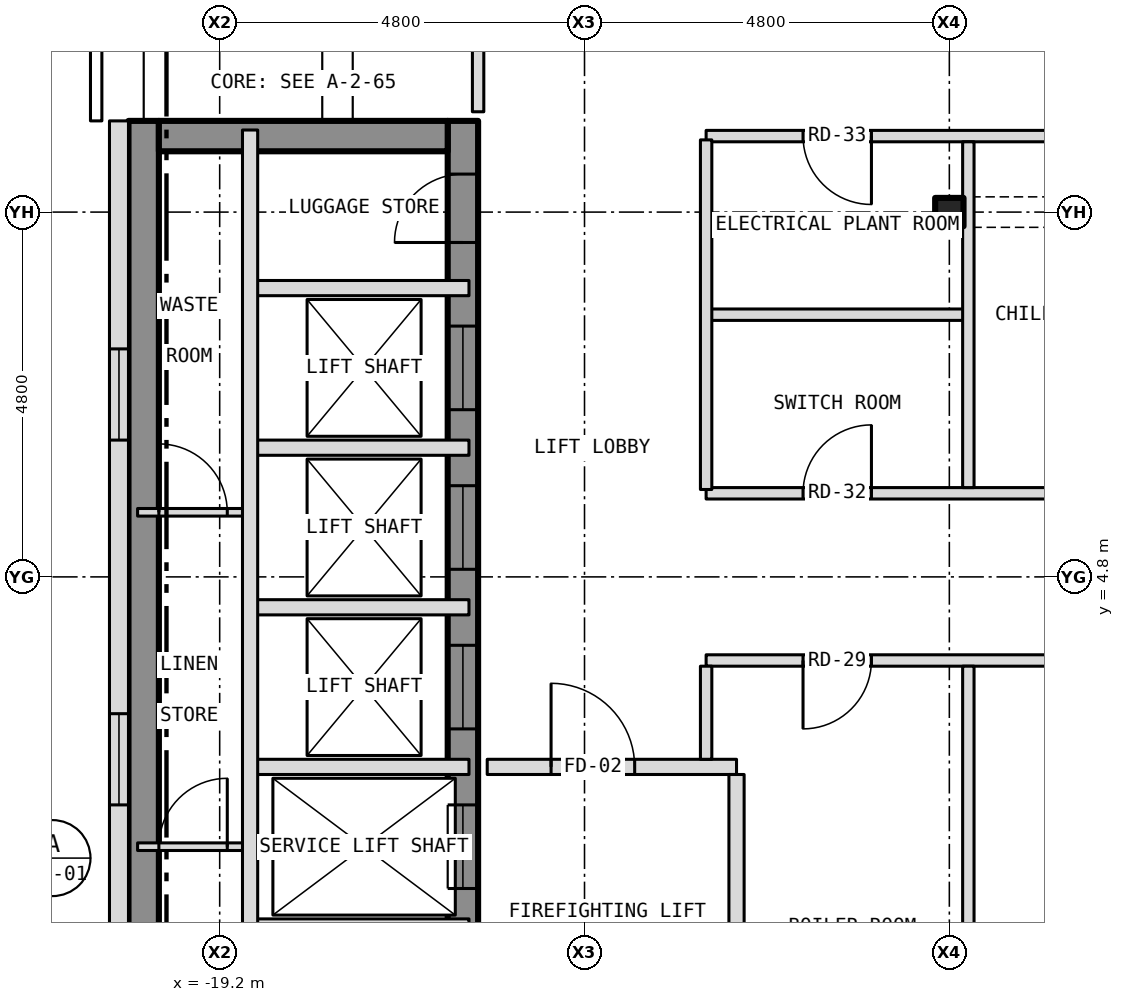
"""IFC4 building model, lengths in metres.
Left out: names, types, materials, properties, quantities, classifications, styles, units other than length and angle.
Written with IfcOpenShell. Run it as: python <this file> out.ifc"""

import sys

from ifc_helpers import new_model, si_unit, direction, frame, frame_2d, origin, origin_2d, place, context, subcontext, project, spatial, rectangle, i_section, extrude, element, fill, save


model = new_model("IFC4")
c1 = context("Model", 3, precision=1e-05, world=origin(), true_north=direction((0.0, 1.0)))
c2 = subcontext(c1, "Body", "Model", "MODEL_VIEW")
j1 = project(units=[si_unit("LENGTHUNIT", "METRE"), si_unit("PLANEANGLEUNIT", "RADIAN")], contexts=[c1])
p1 = place(None, origin())
s1 = spatial("IfcSite", under=j1, at=p1, CompositionType="ELEMENT")
p2 = place(p1, origin())
s2 = spatial("IfcBuilding", under=s1, at=p2, CompositionType="ELEMENT")
p3 = place(p2, frame((0.0, 0.0, 236.5)))
s3 = spatial("IfcBuildingStorey", under=s2, at=p3, CompositionType="ELEMENT", Elevation=236.5)
p4 = place(p3, frame((-9.6, 9.6, -0.3), z_axis=(0.0, 0.0, 1.0), x_axis=(1.0, 0.0, 0.0)))
e1 = element("IfcColumn", 1, at=p4, inside=s3, PredefinedType="COLUMN", context=c2, shape_type="SweptSolid", body=[
    extrude(i_section(OverallWidth=0.373, OverallDepth=0.373, WebThickness=0.016, FlangeThickness=0.026, at=origin_2d()), origin(), (0.0, 0.0, 1.0), 4.65),
])
p5 = place(p3, frame((-16.0, -10.8, 0.0), z_axis=(0.0, 0.0, 1.0), x_axis=(0.0, 1.0, 0.0)))
e2 = element("IfcWall", 2, at=p5, inside=s3, PredefinedType="SHEAR", context=c2, shape_type="SweptSolid", body=[
    extrude(rectangle(XDim=21.6, YDim=0.4, at=frame_2d((10.8, 0.0))), origin(), (0.0, 0.0, 1.0), 3.9),
])
p6 = place(p5, frame((9.4, 0.0, 0.0)))
e3 = element("IfcOpeningElement", 3, at=p6, cuts=e2, PredefinedType="OPENING", context=c2, shape_type="SweptSolid", body=[
    extrude(rectangle(XDim=1.1, YDim=2.1, at=frame_2d((0.55, 1.05))), frame((0.0, 0.212, 0.0), z_axis=(0.0, -1.0, 0.0), x_axis=(1.0, 0.0, 0.0)), (0.0, 0.0, 1.0), 0.424),
])
p7 = place(p5, frame((11.5, 0.0, 0.0)))
e4 = element("IfcOpeningElement", 4, at=p7, cuts=e2, PredefinedType="OPENING", context=c2, shape_type="SweptSolid", body=[
    extrude(rectangle(XDim=1.1, YDim=2.1, at=frame_2d((0.55, 1.05))), frame((0.0, 0.212, 0.0), z_axis=(0.0, -1.0, 0.0), x_axis=(1.0, 0.0, 0.0)), (0.0, 0.0, 1.0), 0.424),
])
p8 = place(p5, frame((13.6, 0.0, 0.0)))
e5 = element("IfcOpeningElement", 5, at=p8, cuts=e2, PredefinedType="OPENING", context=c2, shape_type="SweptSolid", body=[
    extrude(rectangle(XDim=1.1, YDim=2.1, at=frame_2d((0.55, 1.05))), frame((0.0, 0.212, 0.0), z_axis=(0.0, -1.0, 0.0), x_axis=(1.0, 0.0, 0.0)), (0.0, 0.0, 1.0), 0.424),
])
p9 = place(p5, frame((15.7, 0.0, 0.0)))
e6 = element("IfcOpeningElement", 6, at=p9, cuts=e2, PredefinedType="OPENING", context=c2, shape_type="SweptSolid", body=[
    extrude(rectangle(XDim=1.1, YDim=2.1, at=frame_2d((0.55, 1.05))), frame((0.0, 0.212, 0.0), z_axis=(0.0, -1.0, 0.0), x_axis=(1.0, 0.0, 0.0)), (0.0, 0.0, 1.0), 0.424),
])
p10 = place(p5, frame((17.8, 0.0, 0.0)))
e7 = element("IfcOpeningElement", 7, at=p10, cuts=e2, PredefinedType="OPENING", context=c2, shape_type="SweptSolid", body=[
    extrude(rectangle(XDim=1.1, YDim=2.1, at=frame_2d((0.55, 1.05))), frame((0.0, 0.212, 0.0), z_axis=(0.0, -1.0, 0.0), x_axis=(1.0, 0.0, 0.0)), (0.0, 0.0, 1.0), 0.424),
])
p11 = place(p5, frame((0.458, 0.0, 0.0)))
e8 = element("IfcOpeningElement", 8, at=p11, cuts=e2, PredefinedType="OPENING", context=c2, shape_type="SweptSolid", body=[
    extrude(rectangle(XDim=1.1, YDim=2.1, at=frame_2d((0.55, 1.05))), frame((0.0, 0.212, 0.0), z_axis=(0.0, -1.0, 0.0), x_axis=(1.0, 0.0, 0.0)), (0.0, 0.0, 1.0), 0.424),
])
p12 = place(p5, frame((7.5, 0.0, 0.0)))
e9 = element("IfcOpeningElement", 9, at=p12, cuts=e2, PredefinedType="OPENING", context=c2, shape_type="SweptSolid", body=[
    extrude(rectangle(XDim=1.1, YDim=2.1, at=frame_2d((0.55, 1.05))), frame((0.0, 0.212, 0.0), z_axis=(0.0, -1.0, 0.0), x_axis=(1.0, 0.0, 0.0)), (0.0, 0.0, 1.0), 0.424),
])
p13 = place(p5, frame((20.0, 0.0, 0.0)))
e10 = element("IfcOpeningElement", 10, at=p13, cuts=e2, PredefinedType="OPENING", context=c2, shape_type="SweptSolid", body=[
    extrude(rectangle(XDim=0.9, YDim=2.1, at=frame_2d((0.45, 1.05))), frame((0.0, 0.212, 0.0), z_axis=(0.0, -1.0, 0.0), x_axis=(1.0, 0.0, 0.0)), (0.0, 0.0, 1.0), 0.424),
])
p14 = place(p3, frame((-20.2, -10.8, 0.0), z_axis=(0.0, 0.0, 1.0), x_axis=(0.0, 1.0, 0.0)))
e11 = element("IfcWall", 11, at=p14, inside=s3, PredefinedType="SHEAR", context=c2, shape_type="SweptSolid", body=[
    extrude(rectangle(XDim=21.6, YDim=0.4, at=frame_2d((10.8, 0.0))), origin(), (0.0, 0.0, 1.0), 3.9),
])
p15 = place(p3, frame((-20.0, 10.6, 0.0), z_axis=(0.0, 0.0, 1.0), x_axis=(1.0, 0.0, 0.0)))
e12 = element("IfcWall", 12, at=p15, inside=s3, PredefinedType="SHEAR", context=c2, shape_type="SweptSolid", body=[
    extrude(rectangle(XDim=3.8, YDim=0.4, at=frame_2d((1.9, 0.0))), origin(), (0.0, 0.0, 1.0), 3.9),
])
p16 = place(p3, frame((-20.525, 10.8, 0.0), z_axis=(0.0, 0.0, 1.0), x_axis=(0.0, -1.0, 0.0)))
e13 = element("IfcWall", 13, at=p16, inside=s3, PredefinedType="SOLIDWALL", context=c2, shape_type="SweptSolid", body=[
    extrude(rectangle(XDim=21.6, YDim=0.25, at=frame_2d((10.8, 0.0))), origin(), (0.0, 0.0, 1.0), 4.5),
])
p17 = place(p16, frame((3.0, 0.0, 2.2)))
e14 = element("IfcOpeningElement", 14, at=p17, cuts=e13, PredefinedType="OPENING", context=c2, shape_type="SweptSolid", body=[
    extrude(rectangle(XDim=1.2, YDim=0.6, at=frame_2d((0.6, 0.3))), frame((0.0, 0.137, 0.0), z_axis=(0.0, -1.0, 0.0), x_axis=(1.0, 0.0, 0.0)), (0.0, 0.0, 1.0), 0.274),
])
p18 = place(p16, frame((7.8, 0.0, 2.2)))
e15 = element("IfcOpeningElement", 15, at=p18, cuts=e13, PredefinedType="OPENING", context=c2, shape_type="SweptSolid", body=[
    extrude(rectangle(XDim=1.2, YDim=0.6, at=frame_2d((0.6, 0.3))), frame((0.0, 0.137, 0.0), z_axis=(0.0, -1.0, 0.0), x_axis=(1.0, 0.0, 0.0)), (0.0, 0.0, 1.0), 0.274),
])
p19 = place(p16, frame((12.6, 0.0, 2.2)))
e16 = element("IfcOpeningElement", 16, at=p19, cuts=e13, PredefinedType="OPENING", context=c2, shape_type="SweptSolid", body=[
    extrude(rectangle(XDim=1.2, YDim=0.6, at=frame_2d((0.6, 0.3))), frame((0.0, 0.137, 0.0), z_axis=(0.0, -1.0, 0.0), x_axis=(1.0, 0.0, 0.0)), (0.0, 0.0, 1.0), 0.274),
])
p20 = place(p16, frame((17.4, 0.0, 2.2)))
e17 = element("IfcOpeningElement", 17, at=p20, cuts=e13, PredefinedType="OPENING", context=c2, shape_type="SweptSolid", body=[
    extrude(rectangle(XDim=1.2, YDim=0.6, at=frame_2d((0.6, 0.3))), frame((0.0, 0.137, 0.0), z_axis=(0.0, -1.0, 0.0), x_axis=(1.0, 0.0, 0.0)), (0.0, 0.0, 1.0), 0.274),
])
p21 = place(p3, frame((-18.8, 0.2, 0.0), z_axis=(0.0, 0.0, 1.0), x_axis=(1.0, 0.0, 0.0)))
e18 = element("IfcWall", 18, at=p21, inside=s3, PredefinedType="PARTITIONING", context=c2, shape_type="SweptSolid", body=[
    extrude(rectangle(XDim=2.88, YDim=0.2, at=frame_2d((1.44, 0.0))), origin(), (0.0, 0.0, 1.0), 3.9),
])
p22 = place(p3, frame((-20.28, 1.25, 0.0), z_axis=(0.0, 0.0, 1.0), x_axis=(1.0, 0.0, 0.0)))
e19 = element("IfcWall", 19, at=p22, inside=s3, PredefinedType="PARTITIONING", context=c2, shape_type="SweptSolid", body=[
    extrude(rectangle(XDim=1.48, YDim=0.1, at=frame_2d((0.74, 0.0))), origin(), (0.0, 0.0, 1.0), 3.9),
])
p23 = place(p22, frame((0.28, 0.0, 0.0)))
e20 = element("IfcOpeningElement", 20, at=p23, cuts=e19, PredefinedType="OPENING", context=c2, shape_type="SweptSolid", body=[
    extrude(rectangle(XDim=0.9, YDim=2.1, at=frame_2d((0.45, 1.05))), frame((0.0, 0.062, 0.0), z_axis=(0.0, -1.0, 0.0), x_axis=(1.0, 0.0, 0.0)), (0.0, 0.0, 1.0), 0.124),
])
p24 = place(p3, frame((-18.8, 2.3, 0.0), z_axis=(0.0, 0.0, 1.0), x_axis=(1.0, 0.0, 0.0)))
e21 = element("IfcWall", 21, at=p24, inside=s3, PredefinedType="PARTITIONING", context=c2, shape_type="SweptSolid", body=[
    extrude(rectangle(XDim=2.88, YDim=0.2, at=frame_2d((1.44, 0.0))), origin(), (0.0, 0.0, 1.0), 3.9),
])
p25 = place(p3, frame((-15.68, 2.3, 0.0), z_axis=(0.0, 0.0, 1.0), x_axis=(1.0, 0.0, 0.0)))
e22 = element("IfcWall", 22, at=p25, inside=s3, PredefinedType="PARTITIONING", context=c2, shape_type="SweptSolid", body=[
    extrude(rectangle(XDim=3.28, YDim=0.2, at=frame_2d((1.64, 0.0))), origin(), (0.0, 0.0, 1.0), 4.35),
])
p26 = place(p25, frame((0.84, 0.0, 0.0)))
e23 = element("IfcOpeningElement", 23, at=p26, cuts=e22, PredefinedType="OPENING", context=c2, shape_type="SweptSolid", body=[
    extrude(rectangle(XDim=1.1, YDim=2.1, at=frame_2d((0.55, 1.05))), frame((0.0, 0.112, 0.0), z_axis=(0.0, -1.0, 0.0), x_axis=(1.0, 0.0, 0.0)), (0.0, 0.0, 1.0), 0.224),
])
p27 = place(p3, frame((-12.8, 3.7, 0.0), z_axis=(0.0, 0.0, 1.0), x_axis=(1.0, 0.0, 0.0)))
e24 = element("IfcWall", 24, at=p27, inside=s3, PredefinedType="PARTITIONING", context=c2, shape_type="SweptSolid", body=[
    extrude(rectangle(XDim=6.9, YDim=0.15, at=frame_2d((3.45, 0.0))), origin(), (0.0, 0.0, 1.0), 4.35),
])
p28 = place(p27, frame((1.275, 0.0, 0.0)))
e25 = element("IfcOpeningElement", 25, at=p28, cuts=e24, PredefinedType="OPENING", context=c2, shape_type="SweptSolid", body=[
    extrude(rectangle(XDim=0.9, YDim=2.1, at=frame_2d((0.45, 1.05))), frame((0.0, 0.087, 0.0), z_axis=(0.0, -1.0, 0.0), x_axis=(1.0, 0.0, 0.0)), (0.0, 0.0, 1.0), 0.174),
])
p29 = place(p3, frame((-18.8, 4.4, 0.0), z_axis=(0.0, 0.0, 1.0), x_axis=(1.0, 0.0, 0.0)))
e26 = element("IfcWall", 26, at=p29, inside=s3, PredefinedType="PARTITIONING", context=c2, shape_type="SweptSolid", body=[
    extrude(rectangle(XDim=2.88, YDim=0.2, at=frame_2d((1.44, 0.0))), origin(), (0.0, 0.0, 1.0), 3.9),
])
p30 = place(p3, frame((-20.28, 5.65, 0.0), z_axis=(0.0, 0.0, 1.0), x_axis=(1.0, 0.0, 0.0)))
e27 = element("IfcWall", 27, at=p30, inside=s3, PredefinedType="PARTITIONING", context=c2, shape_type="SweptSolid", body=[
    extrude(rectangle(XDim=1.48, YDim=0.1, at=frame_2d((0.74, 0.0))), origin(), (0.0, 0.0, 1.0), 3.9),
])
p31 = place(p30, frame((0.28, 0.0, 0.0)))
e28 = element("IfcOpeningElement", 28, at=p31, cuts=e27, PredefinedType="OPENING", context=c2, shape_type="SweptSolid", body=[
    extrude(rectangle(XDim=0.9, YDim=2.1, at=frame_2d((0.45, 1.05))), frame((0.0, 0.062, 0.0), z_axis=(0.0, -1.0, 0.0), x_axis=(1.0, 0.0, 0.0)), (0.0, 0.0, 1.0), 0.124),
])
p32 = place(p3, frame((-12.8, 5.9, 0.0), z_axis=(0.0, 0.0, 1.0), x_axis=(1.0, 0.0, 0.0)))
e29 = element("IfcWall", 29, at=p32, inside=s3, PredefinedType="PARTITIONING", context=c2, shape_type="SweptSolid", body=[
    extrude(rectangle(XDim=6.9, YDim=0.15, at=frame_2d((3.45, 0.0))), origin(), (0.0, 0.0, 1.0), 4.35),
])
p33 = place(p32, frame((1.275, 0.0, 0.0)))
e30 = element("IfcOpeningElement", 30, at=p33, cuts=e29, PredefinedType="OPENING", context=c2, shape_type="SweptSolid", body=[
    extrude(rectangle(XDim=0.9, YDim=2.1, at=frame_2d((0.45, 1.05))), frame((0.0, 0.087, 0.0), z_axis=(0.0, -1.0, 0.0), x_axis=(1.0, 0.0, 0.0)), (0.0, 0.0, 1.0), 0.174),
])
p34 = place(p3, frame((-18.8, 6.5, 0.0), z_axis=(0.0, 0.0, 1.0), x_axis=(1.0, 0.0, 0.0)))
e31 = element("IfcWall", 31, at=p34, inside=s3, PredefinedType="PARTITIONING", context=c2, shape_type="SweptSolid", body=[
    extrude(rectangle(XDim=2.88, YDim=0.2, at=frame_2d((1.44, 0.0))), origin(), (0.0, 0.0, 1.0), 3.9),
])
p35 = place(p3, frame((-12.8, 8.25, 0.0), z_axis=(0.0, 0.0, 1.0), x_axis=(1.0, 0.0, 0.0)))
e32 = element("IfcWall", 32, at=p35, inside=s3, PredefinedType="PARTITIONING", context=c2, shape_type="SweptSolid", body=[
    extrude(rectangle(XDim=3.45, YDim=0.15, at=frame_2d((1.725, 0.0))), origin(), (0.0, 0.0, 1.0), 4.35),
])
p36 = place(p3, frame((-18.8, 8.6, 0.0), z_axis=(0.0, 0.0, 1.0), x_axis=(1.0, 0.0, 0.0)))
e33 = element("IfcWall", 33, at=p36, inside=s3, PredefinedType="PARTITIONING", context=c2, shape_type="SweptSolid", body=[
    extrude(rectangle(XDim=2.88, YDim=0.2, at=frame_2d((1.44, 0.0))), origin(), (0.0, 0.0, 1.0), 3.9),
])
p37 = place(p3, frame((-12.8, 10.6, 0.0), z_axis=(0.0, 0.0, 1.0), x_axis=(1.0, 0.0, 0.0)))
e34 = element("IfcWall", 34, at=p37, inside=s3, PredefinedType="PARTITIONING", context=c2, shape_type="SweptSolid", body=[
    extrude(rectangle(XDim=6.9, YDim=0.15, at=frame_2d((3.45, 0.0))), origin(), (0.0, 0.0, 1.0), 4.35),
])
p38 = place(p37, frame((1.275, 0.0, 0.0)))
e35 = element("IfcOpeningElement", 35, at=p38, cuts=e34, PredefinedType="OPENING", context=c2, shape_type="SweptSolid", body=[
    extrude(rectangle(XDim=0.9, YDim=2.1, at=frame_2d((0.45, 1.05))), frame((0.0, 0.087, 0.0), z_axis=(0.0, -1.0, 0.0), x_axis=(1.0, 0.0, 0.0)), (0.0, 0.0, 1.0), 0.174),
])
p39 = place(p3, frame((-18.8, -1.8, 0.0), z_axis=(0.0, 0.0, 1.0), x_axis=(0.0, 1.0, 0.0)))
e36 = element("IfcWall", 36, at=p39, inside=s3, PredefinedType="PARTITIONING", context=c2, shape_type="SweptSolid", body=[
    extrude(rectangle(XDim=12.48, YDim=0.2, at=frame_2d((6.24, 0.0))), origin(), (0.0, 0.0, 1.0), 3.9),
])
p40 = place(p3, frame((-15.8, 10.92, 0.0), z_axis=(0.0, 0.0, 1.0), x_axis=(0.0, 1.0, 0.0)))
e37 = element("IfcWall", 37, at=p40, inside=s3, PredefinedType="PARTITIONING", context=c2, shape_type="SweptSolid", body=[
    extrude(rectangle(XDim=1.805, YDim=0.15, at=frame_2d((0.903, 0.0))), origin(), (0.0, 0.0, 1.0), 4.35),
])
p41 = place(p3, frame((-12.8, 2.4, 0.0), z_axis=(0.0, 0.0, 1.0), x_axis=(0.0, 1.0, 0.0)))
e38 = element("IfcWall", 38, at=p41, inside=s3, PredefinedType="PARTITIONING", context=c2, shape_type="SweptSolid", body=[
    extrude(rectangle(XDim=1.225, YDim=0.15, at=frame_2d((0.613, 0.0))), origin(), (0.0, 0.0, 1.0), 4.35),
])
p42 = place(p3, frame((-12.8, 5.95, 0.0), z_axis=(0.0, 0.0, 1.0), x_axis=(0.0, 1.0, 0.0)))
e39 = element("IfcWall", 39, at=p42, inside=s3, PredefinedType="PARTITIONING", context=c2, shape_type="SweptSolid", body=[
    extrude(rectangle(XDim=4.6, YDim=0.15, at=frame_2d((2.3, 0.0))), origin(), (0.0, 0.0, 1.0), 4.35),
])
p43 = place(p3, frame((-12.4, -1.8, 0.0), z_axis=(0.0, 0.0, 1.0), x_axis=(0.0, 1.0, 0.0)))
e40 = element("IfcWall", 40, at=p43, inside=s3, PredefinedType="PARTITIONING", context=c2, shape_type="SweptSolid", body=[
    extrude(rectangle(XDim=4.0, YDim=0.2, at=frame_2d((2.0, 0.0))), origin(), (0.0, 0.0, 1.0), 4.35),
])
p44 = place(p3, frame((-9.35, -3.375, 0.0), z_axis=(0.0, 0.0, 1.0), x_axis=(0.0, 1.0, 0.0)))
e41 = element("IfcWall", 41, at=p44, inside=s3, PredefinedType="PARTITIONING", context=c2, shape_type="SweptSolid", body=[
    extrude(rectangle(XDim=7.0, YDim=0.15, at=frame_2d((3.5, 0.0))), origin(), (0.0, 0.0, 1.0), 4.35),
])
p45 = place(p3, frame((-9.35, 5.975, 0.0), z_axis=(0.0, 0.0, 1.0), x_axis=(0.0, 1.0, 0.0)))
e42 = element("IfcWall", 42, at=p45, inside=s3, PredefinedType="PARTITIONING", context=c2, shape_type="SweptSolid", body=[
    extrude(rectangle(XDim=4.55, YDim=0.15, at=frame_2d((2.275, 0.0))), origin(), (0.0, 0.0, 1.0), 4.35),
])
p46 = place(p17, origin())
e43 = element("IfcWindow", 43, at=p46, inside=s3, PartitioningType="SINGLE_PANEL", PredefinedType="WINDOW", context=c2, shape_type="SweptSolid", body=[
    extrude(rectangle(XDim=1.2, YDim=0.6, at=frame_2d((0.6, 0.3))), frame((0.0, -0.035, 0.0), z_axis=(0.0, -1.0, 0.0), x_axis=(1.0, 0.0, 0.0)), (0.0, 0.0, 1.0), 0.06),
])
fill(e14, e43)
p47 = place(p18, origin())
e44 = element("IfcWindow", 44, at=p47, inside=s3, PartitioningType="SINGLE_PANEL", PredefinedType="WINDOW", context=c2, shape_type="SweptSolid", body=[
    extrude(rectangle(XDim=1.2, YDim=0.6, at=frame_2d((0.6, 0.3))), frame((0.0, -0.035, 0.0), z_axis=(0.0, -1.0, 0.0), x_axis=(1.0, 0.0, 0.0)), (0.0, 0.0, 1.0), 0.06),
])
fill(e15, e44)
p48 = place(p7, origin())
e45 = element("IfcDoor", 45, at=p48, inside=s3, OperationType="SLIDING_TO_LEFT", PredefinedType="DOOR", context=c2, shape_type="SweptSolid", body=[
    extrude(rectangle(XDim=1.1, YDim=2.1, at=frame_2d((0.55, 1.05))), frame((0.0, 0.025, 0.0), z_axis=(0.0, -1.0, 0.0), x_axis=(1.0, 0.0, 0.0)), (0.0, 0.0, 1.0), 0.05),
])
fill(e4, e45)
p49 = place(p8, origin())
e46 = element("IfcDoor", 46, at=p49, inside=s3, OperationType="SLIDING_TO_LEFT", PredefinedType="DOOR", context=c2, shape_type="SweptSolid", body=[
    extrude(rectangle(XDim=1.1, YDim=2.1, at=frame_2d((0.55, 1.05))), frame((0.0, 0.025, 0.0), z_axis=(0.0, -1.0, 0.0), x_axis=(1.0, 0.0, 0.0)), (0.0, 0.0, 1.0), 0.05),
])
fill(e5, e46)
p50 = place(p9, origin())
e47 = element("IfcDoor", 47, at=p50, inside=s3, OperationType="SLIDING_TO_LEFT", PredefinedType="DOOR", context=c2, shape_type="SweptSolid", body=[
    extrude(rectangle(XDim=1.1, YDim=2.1, at=frame_2d((0.55, 1.05))), frame((0.0, 0.025, 0.0), z_axis=(0.0, -1.0, 0.0), x_axis=(1.0, 0.0, 0.0)), (0.0, 0.0, 1.0), 0.05),
])
fill(e6, e47)
p51 = place(p10, origin())
e48 = element("IfcDoor", 48, at=p51, inside=s3, OperationType="SLIDING_TO_LEFT", PredefinedType="DOOR", context=c2, shape_type="SweptSolid", body=[
    extrude(rectangle(XDim=1.1, YDim=2.1, at=frame_2d((0.55, 1.05))), frame((0.0, 0.025, 0.0), z_axis=(0.0, -1.0, 0.0), x_axis=(1.0, 0.0, 0.0)), (0.0, 0.0, 1.0), 0.05),
])
fill(e7, e48)
p52 = place(p13, origin())
e49 = element("IfcDoor", 49, at=p52, inside=s3, OperationType="SINGLE_SWING_LEFT", PredefinedType="DOOR", context=c2, shape_type="SweptSolid", body=[
    extrude(rectangle(XDim=0.9, YDim=2.1, at=frame_2d((0.45, 1.05))), frame((0.0, 0.025, 0.0), z_axis=(0.0, -1.0, 0.0), x_axis=(1.0, 0.0, 0.0)), (0.0, 0.0, 1.0), 0.05),
])
fill(e10, e49)
p53 = place(p23, origin())
e50 = element("IfcDoor", 50, at=p53, inside=s3, OperationType="SINGLE_SWING_RIGHT", PredefinedType="DOOR", context=c2, shape_type="SweptSolid", body=[
    extrude(rectangle(XDim=0.9, YDim=2.1, at=frame_2d((0.45, 1.05))), frame((0.0, 0.025, 0.0), z_axis=(0.0, -1.0, 0.0), x_axis=(1.0, 0.0, 0.0)), (0.0, 0.0, 1.0), 0.05),
])
fill(e20, e50)
p54 = place(p31, origin())
e51 = element("IfcDoor", 51, at=p54, inside=s3, OperationType="SINGLE_SWING_LEFT", PredefinedType="DOOR", context=c2, shape_type="SweptSolid", body=[
    extrude(rectangle(XDim=0.9, YDim=2.1, at=frame_2d((0.45, 1.05))), frame((0.0, 0.025, 0.0), z_axis=(0.0, -1.0, 0.0), x_axis=(1.0, 0.0, 0.0)), (0.0, 0.0, 1.0), 0.05),
])
fill(e28, e51)
p55 = place(p26, origin())
e52 = element("IfcDoor", 52, at=p55, inside=s3, OperationType="SINGLE_SWING_LEFT", PredefinedType="DOOR", context=c2, shape_type="SweptSolid", body=[
    extrude(rectangle(XDim=1.1, YDim=2.1, at=frame_2d((0.55, 1.05))), frame((0.0, 0.025, 0.0), z_axis=(0.0, -1.0, 0.0), x_axis=(1.0, 0.0, 0.0)), (0.0, 0.0, 1.0), 0.05),
])
fill(e23, e52)
p56 = place(p28, origin())
e53 = element("IfcDoor", 53, at=p56, inside=s3, OperationType="SINGLE_SWING_LEFT", PredefinedType="DOOR", context=c2, shape_type="SweptSolid", body=[
    extrude(rectangle(XDim=0.9, YDim=2.1, at=frame_2d((0.45, 1.05))), frame((0.0, 0.025, 0.0), z_axis=(0.0, -1.0, 0.0), x_axis=(1.0, 0.0, 0.0)), (0.0, 0.0, 1.0), 0.05),
])
fill(e25, e53)
p57 = place(p33, origin())
e54 = element("IfcDoor", 54, at=p57, inside=s3, OperationType="SINGLE_SWING_RIGHT", PredefinedType="DOOR", context=c2, shape_type="SweptSolid", body=[
    extrude(rectangle(XDim=0.9, YDim=2.1, at=frame_2d((0.45, 1.05))), frame((0.0, 0.025, 0.0), z_axis=(0.0, -1.0, 0.0), x_axis=(1.0, 0.0, 0.0)), (0.0, 0.0, 1.0), 0.05),
])
fill(e30, e54)
p58 = place(p38, origin())
e55 = element("IfcDoor", 55, at=p58, inside=s3, OperationType="SINGLE_SWING_RIGHT", PredefinedType="DOOR", context=c2, shape_type="SweptSolid", body=[
    extrude(rectangle(XDim=0.9, YDim=2.1, at=frame_2d((0.45, 1.05))), frame((0.0, 0.025, 0.0), z_axis=(0.0, -1.0, 0.0), x_axis=(1.0, 0.0, 0.0)), (0.0, 0.0, 1.0), 0.05),
])
fill(e35, e55)
save(model, sys.argv[1])
